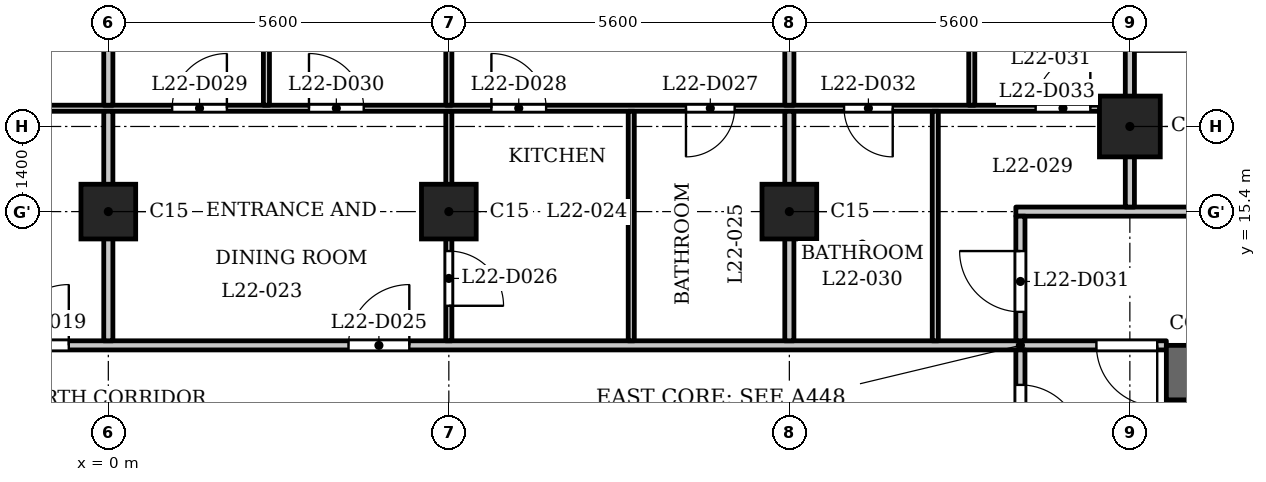
"""IFC4 building model, lengths in metres.
Left out: names, types, materials, properties, quantities, classifications, styles, units other than length and angle.
Written with IfcOpenShell. Run it as: python <this file> out.ifc"""

import sys

from ifc_helpers import new_model, si_unit, direction, frame, frame_2d, origin, origin_2d, place, context, subcontext, project, spatial, rectangle, extrude, element, fill, save


model = new_model("IFC4")
c1 = context("Model", 3, precision=1e-05, world=origin(), true_north=direction((0.0, 1.0)))
c2 = subcontext(c1, "Body", "Model", "MODEL_VIEW")
j1 = project(units=[si_unit("LENGTHUNIT", "METRE"), si_unit("PLANEANGLEUNIT", "RADIAN")], contexts=[c1])
p1 = place(None, origin())
s1 = spatial("IfcSite", under=j1, at=p1, CompositionType="ELEMENT")
p2 = place(p1, origin())
s2 = spatial("IfcBuilding", under=s1, at=p2, CompositionType="ELEMENT")
p3 = place(p2, frame((0.0, 0.0, 90.3)))
s3 = spatial("IfcBuildingStorey", under=s2, at=p3, CompositionType="ELEMENT", Elevation=90.3)
p4 = place(p3, frame((16.8, 16.8, 0.0), z_axis=(0.0, 0.0, 1.0), x_axis=(1.0, 0.0, 0.0)))
e1 = element("IfcColumn", 1, at=p4, inside=s3, PredefinedType="COLUMN", context=c2, shape_type="SweptSolid", body=[
    extrude(rectangle(XDim=1.0, YDim=1.0, at=origin_2d()), origin(), (0.0, 0.0, 1.0), 3.5),
])
for number, where, z_axis, x_axis in (
    (2, (0.0, 15.4, 0.0), (0.0, 0.0, 1.0), (1.0, 0.0, 0.0)),
    (3, (5.6, 15.4, 0.0), (0.0, 0.0, 1.0), (1.0, 0.0, 0.0)),
    (4, (11.2, 15.4, 0.0), (0.0, 0.0, 1.0), (1.0, 0.0, 0.0)),
):
    element("IfcColumn", number, at=place(p3, frame(where, z_axis=z_axis, x_axis=x_axis)), inside=s3, PredefinedType="COLUMN", context=c2, shape_type="SweptSolid", body=[
        extrude(rectangle(XDim=0.9, YDim=0.9, at=origin_2d()), origin(), (0.0, 0.0, 1.0), 3.5),
    ])
p5 = place(p3, frame((17.4, 12.75, 0.0), z_axis=(0.0, 0.0, 1.0), x_axis=(1.0, 0.0, 0.0)))
e5 = element("IfcWall", 5, at=p5, inside=s3, PredefinedType="SHEAR", context=c2, shape_type="SweptSolid", body=[
    extrude(rectangle(XDim=10.4, YDim=0.9, at=frame_2d((5.2, 0.0))), origin(), (0.0, 0.0, 1.0), 3.2),
])
p6 = place(p3, frame((17.6, -12.3, 0.0), z_axis=(0.0, 0.0, 1.0), x_axis=(0.0, 1.0, 0.0)))
e6 = element("IfcWall", 6, at=p6, inside=s3, PredefinedType="SHEAR", context=c2, shape_type="SweptSolid", body=[
    extrude(rectangle(XDim=24.6, YDim=0.4, at=frame_2d((12.3, 0.0))), origin(), (0.0, 0.0, 1.0), 3.2),
])
p7 = place(p6, frame((6.0, 0.0, 0.0)))
e7 = element("IfcOpeningElement", 7, at=p7, cuts=e6, PredefinedType="OPENING", context=c2, shape_type="SweptSolid", body=[
    extrude(rectangle(XDim=1.1, YDim=2.1, at=frame_2d((0.55, 1.05))), frame((0.0, 0.21, 0.0), z_axis=(0.0, -1.0, 0.0), x_axis=(1.0, 0.0, 0.0)), (0.0, 0.0, 1.0), 0.42),
])
p8 = place(p6, frame((8.4, 0.0, 0.0)))
e8 = element("IfcOpeningElement", 8, at=p8, cuts=e6, PredefinedType="OPENING", context=c2, shape_type="SweptSolid", body=[
    extrude(rectangle(XDim=1.1, YDim=2.1, at=frame_2d((0.55, 1.05))), frame((0.0, 0.21, 0.0), z_axis=(0.0, -1.0, 0.0), x_axis=(1.0, 0.0, 0.0)), (0.0, 0.0, 1.0), 0.42),
])
p9 = place(p6, frame((10.8, 0.0, 0.0)))
e9 = element("IfcOpeningElement", 9, at=p9, cuts=e6, PredefinedType="OPENING", context=c2, shape_type="SweptSolid", body=[
    extrude(rectangle(XDim=1.1, YDim=2.1, at=frame_2d((0.55, 1.05))), frame((0.0, 0.21, 0.0), z_axis=(0.0, -1.0, 0.0), x_axis=(1.0, 0.0, 0.0)), (0.0, 0.0, 1.0), 0.42),
])
p10 = place(p6, frame((16.75, 0.0, 0.0)))
e10 = element("IfcOpeningElement", 10, at=p10, cuts=e6, PredefinedType="OPENING", context=c2, shape_type="SweptSolid", body=[
    extrude(rectangle(XDim=0.9, YDim=2.1, at=frame_2d((0.45, 1.05))), frame((0.0, 0.21, 0.0), z_axis=(0.0, -1.0, 0.0), x_axis=(1.0, 0.0, 0.0)), (0.0, 0.0, 1.0), 0.42),
])
p11 = place(p6, frame((22.8, 0.0, 0.0)))
e11 = element("IfcOpeningElement", 11, at=p11, cuts=e6, PredefinedType="OPENING", context=c2, shape_type="SweptSolid", body=[
    extrude(rectangle(XDim=1.1, YDim=2.1, at=frame_2d((0.55, 1.05))), frame((0.0, 0.21, 0.0), z_axis=(0.0, -1.0, 0.0), x_axis=(1.0, 0.0, 0.0)), (0.0, 0.0, 1.0), 0.42),
])
p12 = place(p6, frame((0.7, 0.0, 0.0)))
e12 = element("IfcOpeningElement", 12, at=p12, cuts=e6, PredefinedType="OPENING", context=c2, shape_type="SweptSolid", body=[
    extrude(rectangle(XDim=1.1, YDim=2.1, at=frame_2d((0.55, 1.05))), frame((0.0, 0.21, 0.0), z_axis=(0.0, -1.0, 0.0), x_axis=(1.0, 0.0, 0.0)), (0.0, 0.0, 1.0), 0.42),
])
p13 = place(p6, frame((12.775, 0.0, 0.0)))
e13 = element("IfcOpeningElement", 13, at=p13, cuts=e6, PredefinedType="OPENING", context=c2, shape_type="SweptSolid", body=[
    extrude(rectangle(XDim=1.8, YDim=2.1, at=frame_2d((0.9, 1.05))), frame((0.0, 0.21, 0.0), z_axis=(0.0, -1.0, 0.0), x_axis=(1.0, 0.0, 0.0)), (0.0, 0.0, 1.0), 0.42),
])
p14 = place(p3, frame((-17.4, 13.2, 0.0), z_axis=(0.0, 0.0, 1.0), x_axis=(1.0, 0.0, 0.0)))
e14 = element("IfcWall", 14, at=p14, inside=s3, PredefinedType="PARTITIONING", context=c2, shape_type="SweptSolid", body=[
    extrude(rectangle(XDim=34.8, YDim=0.15, at=frame_2d((17.4, 0.0))), origin(), (0.0, 0.0, 1.0), 3.2),
])
p15 = place(p14, frame((0.25, 0.0, 0.0)))
e15 = element("IfcOpeningElement", 15, at=p15, cuts=e14, PredefinedType="OPENING", context=c2, shape_type="SweptSolid", body=[
    extrude(rectangle(XDim=1.0, YDim=2.1, at=frame_2d((0.5, 1.05))), frame((0.0, 0.085, 0.0), z_axis=(0.0, -1.0, 0.0), x_axis=(1.0, 0.0, 0.0)), (0.0, 0.0, 1.0), 0.17),
])
p16 = place(p14, frame((33.65, 0.0, 0.0)))
e16 = element("IfcOpeningElement", 16, at=p16, cuts=e14, PredefinedType="OPENING", context=c2, shape_type="SweptSolid", body=[
    extrude(rectangle(XDim=1.0, YDim=2.1, at=frame_2d((0.5, 1.05))), frame((0.0, 0.085, 0.0), z_axis=(0.0, -1.0, 0.0), x_axis=(1.0, 0.0, 0.0)), (0.0, 0.0, 1.0), 0.17),
])
p17 = place(p14, frame((15.75, 0.0, 0.0)))
e17 = element("IfcOpeningElement", 17, at=p17, cuts=e14, PredefinedType="OPENING", context=c2, shape_type="SweptSolid", body=[
    extrude(rectangle(XDim=1.0, YDim=2.1, at=frame_2d((0.5, 1.05))), frame((0.0, 0.085, 0.0), z_axis=(0.0, -1.0, 0.0), x_axis=(1.0, 0.0, 0.0)), (0.0, 0.0, 1.0), 0.17),
])
p18 = place(p14, frame((21.35, 0.0, 0.0)))
e18 = element("IfcOpeningElement", 18, at=p18, cuts=e14, PredefinedType="OPENING", context=c2, shape_type="SweptSolid", body=[
    extrude(rectangle(XDim=1.0, YDim=2.1, at=frame_2d((0.5, 1.05))), frame((0.0, 0.085, 0.0), z_axis=(0.0, -1.0, 0.0), x_axis=(1.0, 0.0, 0.0)), (0.0, 0.0, 1.0), 0.17),
])
p19 = place(p3, frame((14.925, 15.4, 0.0), z_axis=(0.0, 0.0, 1.0), x_axis=(1.0, 0.0, 0.0)))
e19 = element("IfcWall", 19, at=p19, inside=s3, PredefinedType="PARTITIONING", context=c2, shape_type="SweptSolid", body=[
    extrude(rectangle(XDim=12.559, YDim=0.15, at=frame_2d((6.279, 0.0))), origin(), (0.0, 0.0, 1.0), 3.2),
])
p20 = place(p19, frame((5.825, 0.0, 0.0)))
e20 = element("IfcOpeningElement", 20, at=p20, cuts=e19, PredefinedType="OPENING", context=c2, shape_type="SweptSolid", body=[
    extrude(rectangle(XDim=1.0, YDim=2.1, at=frame_2d((0.5, 1.05))), frame((0.0, 0.085, 0.0), z_axis=(0.0, -1.0, 0.0), x_axis=(1.0, 0.0, 0.0)), (0.0, 0.0, 1.0), 0.17),
])
p21 = place(p3, frame((-16.725, 17.1, 0.0), z_axis=(0.0, 0.0, 1.0), x_axis=(1.0, 0.0, 0.0)))
e21 = element("IfcWall", 21, at=p21, inside=s3, PredefinedType="PARTITIONING", context=c2, shape_type="SweptSolid", body=[
    extrude(rectangle(XDim=33.45, YDim=0.1, at=frame_2d((16.725, 0.0))), origin(), (0.0, 0.0, 1.0), 3.2),
])
p22 = place(p21, frame((3.925, 0.0, 0.0)))
e22 = element("IfcOpeningElement", 22, at=p22, cuts=e21, PredefinedType="OPENING", context=c2, shape_type="SweptSolid", body=[
    extrude(rectangle(XDim=0.8, YDim=2.1, at=frame_2d((0.4, 1.05))), frame((0.0, 0.06, 0.0), z_axis=(0.0, -1.0, 0.0), x_axis=(1.0, 0.0, 0.0)), (0.0, 0.0, 1.0), 0.12),
])
p23 = place(p21, frame((0.975, 0.0, 0.0)))
e23 = element("IfcOpeningElement", 23, at=p23, cuts=e21, PredefinedType="OPENING", context=c2, shape_type="SweptSolid", body=[
    extrude(rectangle(XDim=0.9, YDim=2.1, at=frame_2d((0.45, 1.05))), frame((0.0, 0.06, 0.0), z_axis=(0.0, -1.0, 0.0), x_axis=(1.0, 0.0, 0.0)), (0.0, 0.0, 1.0), 0.12),
])
p24 = place(p21, frame((6.425, 0.0, 0.0)))
e24 = element("IfcOpeningElement", 24, at=p24, cuts=e21, PredefinedType="OPENING", context=c2, shape_type="SweptSolid", body=[
    extrude(rectangle(XDim=0.8, YDim=2.1, at=frame_2d((0.4, 1.05))), frame((0.0, 0.06, 0.0), z_axis=(0.0, -1.0, 0.0), x_axis=(1.0, 0.0, 0.0)), (0.0, 0.0, 1.0), 0.12),
])
p25 = place(p21, frame((8.825, 0.0, 0.0)))
e25 = element("IfcOpeningElement", 25, at=p25, cuts=e21, PredefinedType="OPENING", context=c2, shape_type="SweptSolid", body=[
    extrude(rectangle(XDim=0.9, YDim=2.1, at=frame_2d((0.45, 1.05))), frame((0.0, 0.06, 0.0), z_axis=(0.0, -1.0, 0.0), x_axis=(1.0, 0.0, 0.0)), (0.0, 0.0, 1.0), 0.12),
])
p26 = place(p21, frame((12.375, 0.0, 0.0)))
e26 = element("IfcOpeningElement", 26, at=p26, cuts=e21, PredefinedType="OPENING", context=c2, shape_type="SweptSolid", body=[
    extrude(rectangle(XDim=0.9, YDim=2.1, at=frame_2d((0.45, 1.05))), frame((0.0, 0.06, 0.0), z_axis=(0.0, -1.0, 0.0), x_axis=(1.0, 0.0, 0.0)), (0.0, 0.0, 1.0), 0.12),
])
p27 = place(p21, frame((14.425, 0.0, 0.0)))
e27 = element("IfcOpeningElement", 27, at=p27, cuts=e21, PredefinedType="OPENING", context=c2, shape_type="SweptSolid", body=[
    extrude(rectangle(XDim=0.9, YDim=2.1, at=frame_2d((0.45, 1.05))), frame((0.0, 0.06, 0.0), z_axis=(0.0, -1.0, 0.0), x_axis=(1.0, 0.0, 0.0)), (0.0, 0.0, 1.0), 0.12),
])
p28 = place(p21, frame((26.225, 0.0, 0.0)))
e28 = element("IfcOpeningElement", 28, at=p28, cuts=e21, PredefinedType="OPENING", context=c2, shape_type="SweptSolid", body=[
    extrude(rectangle(XDim=0.8, YDim=2.1, at=frame_2d((0.4, 1.05))), frame((0.0, 0.06, 0.0), z_axis=(0.0, -1.0, 0.0), x_axis=(1.0, 0.0, 0.0)), (0.0, 0.0, 1.0), 0.12),
])
p29 = place(p21, frame((23.025, 0.0, 0.0)))
e29 = element("IfcOpeningElement", 29, at=p29, cuts=e21, PredefinedType="OPENING", context=c2, shape_type="SweptSolid", body=[
    extrude(rectangle(XDim=0.9, YDim=2.1, at=frame_2d((0.45, 1.05))), frame((0.0, 0.06, 0.0), z_axis=(0.0, -1.0, 0.0), x_axis=(1.0, 0.0, 0.0)), (0.0, 0.0, 1.0), 0.12),
])
p30 = place(p21, frame((17.775, 0.0, 0.0)))
e30 = element("IfcOpeningElement", 30, at=p30, cuts=e21, PredefinedType="OPENING", context=c2, shape_type="SweptSolid", body=[
    extrude(rectangle(XDim=0.9, YDim=2.1, at=frame_2d((0.45, 1.05))), frame((0.0, 0.06, 0.0), z_axis=(0.0, -1.0, 0.0), x_axis=(1.0, 0.0, 0.0)), (0.0, 0.0, 1.0), 0.12),
])
p31 = place(p21, frame((20.025, 0.0, 0.0)))
e31 = element("IfcOpeningElement", 31, at=p31, cuts=e21, PredefinedType="OPENING", context=c2, shape_type="SweptSolid", body=[
    extrude(rectangle(XDim=0.9, YDim=2.1, at=frame_2d((0.45, 1.05))), frame((0.0, 0.06, 0.0), z_axis=(0.0, -1.0, 0.0), x_axis=(1.0, 0.0, 0.0)), (0.0, 0.0, 1.0), 0.12),
])
p32 = place(p21, frame((28.825, 0.0, 0.0)))
e32 = element("IfcOpeningElement", 32, at=p32, cuts=e21, PredefinedType="OPENING", context=c2, shape_type="SweptSolid", body=[
    extrude(rectangle(XDim=0.8, YDim=2.1, at=frame_2d((0.4, 1.05))), frame((0.0, 0.06, 0.0), z_axis=(0.0, -1.0, 0.0), x_axis=(1.0, 0.0, 0.0)), (0.0, 0.0, 1.0), 0.12),
])
p33 = place(p21, frame((31.975, 0.0, 0.0)))
e33 = element("IfcOpeningElement", 33, at=p33, cuts=e21, PredefinedType="OPENING", context=c2, shape_type="SweptSolid", body=[
    extrude(rectangle(XDim=0.9, YDim=2.1, at=frame_2d((0.45, 1.05))), frame((0.0, 0.06, 0.0), z_axis=(0.0, -1.0, 0.0), x_axis=(1.0, 0.0, 0.0)), (0.0, 0.0, 1.0), 0.12),
])
p34 = place(p3, frame((0.0, 13.275, 0.0), z_axis=(0.0, 0.0, 1.0), x_axis=(0.0, 1.0, 0.0)))
e34 = element("IfcWall", 34, at=p34, inside=s3, PredefinedType="PARTITIONING", context=c2, shape_type="SweptSolid", body=[
    extrude(rectangle(XDim=3.775, YDim=0.15, at=frame_2d((1.888, 0.0))), origin(), (0.0, 0.0, 1.0), 3.2),
])
p35 = place(p3, frame((0.0, 17.15, 0.0), z_axis=(0.0, 0.0, 1.0), x_axis=(0.0, 1.0, 0.0)))
e35 = element("IfcWall", 35, at=p35, inside=s3, PredefinedType="PARTITIONING", context=c2, shape_type="SweptSolid", body=[
    extrude(rectangle(XDim=5.88, YDim=0.15, at=frame_2d((2.94, 0.0))), origin(), (0.0, 0.0, 1.0), 3.2),
])
p36 = place(p3, frame((2.6, 17.15, 0.0), z_axis=(0.0, 0.0, 1.0), x_axis=(0.0, 1.0, 0.0)))
e36 = element("IfcWall", 36, at=p36, inside=s3, PredefinedType="PARTITIONING", context=c2, shape_type="SweptSolid", body=[
    extrude(rectangle(XDim=4.93, YDim=0.1, at=frame_2d((2.465, 0.0))), origin(), (0.0, 0.0, 1.0), 3.2),
])
p37 = place(p3, frame((5.6, 13.275, 0.0), z_axis=(0.0, 0.0, 1.0), x_axis=(0.0, 1.0, 0.0)))
e37 = element("IfcWall", 37, at=p37, inside=s3, PredefinedType="PARTITIONING", context=c2, shape_type="SweptSolid", body=[
    extrude(rectangle(XDim=3.775, YDim=0.1, at=frame_2d((1.888, 0.0))), origin(), (0.0, 0.0, 1.0), 3.2),
])
p38 = place(p37, frame((0.576, 0.0, 0.0)))
e38 = element("IfcOpeningElement", 38, at=p38, cuts=e37, PredefinedType="OPENING", context=c2, shape_type="SweptSolid", body=[
    extrude(rectangle(XDim=0.9, YDim=2.1, at=frame_2d((0.45, 1.05))), frame((0.0, 0.06, 0.0), z_axis=(0.0, -1.0, 0.0), x_axis=(1.0, 0.0, 0.0)), (0.0, 0.0, 1.0), 0.12),
])
p39 = place(p3, frame((5.6, 17.15, 0.0), z_axis=(0.0, 0.0, 1.0), x_axis=(0.0, 1.0, 0.0)))
e39 = element("IfcWall", 39, at=p39, inside=s3, PredefinedType="PARTITIONING", context=c2, shape_type="SweptSolid", body=[
    extrude(rectangle(XDim=5.88, YDim=0.1, at=frame_2d((2.94, 0.0))), origin(), (0.0, 0.0, 1.0), 3.2),
])
p40 = place(p3, frame((8.6, 13.275, 0.0), z_axis=(0.0, 0.0, 1.0), x_axis=(0.0, 1.0, 0.0)))
e40 = element("IfcWall", 40, at=p40, inside=s3, PredefinedType="PARTITIONING", context=c2, shape_type="SweptSolid", body=[
    extrude(rectangle(XDim=3.775, YDim=0.1, at=frame_2d((1.888, 0.0))), origin(), (0.0, 0.0, 1.0), 3.2),
])
p41 = place(p3, frame((11.2, 13.275, 0.0), z_axis=(0.0, 0.0, 1.0), x_axis=(0.0, 1.0, 0.0)))
e41 = element("IfcWall", 41, at=p41, inside=s3, PredefinedType="PARTITIONING", context=c2, shape_type="SweptSolid", body=[
    extrude(rectangle(XDim=3.775, YDim=0.15, at=frame_2d((1.888, 0.0))), origin(), (0.0, 0.0, 1.0), 3.2),
])
p42 = place(p3, frame((11.2, 17.15, 0.0), z_axis=(0.0, 0.0, 1.0), x_axis=(0.0, 1.0, 0.0)))
e42 = element("IfcWall", 42, at=p42, inside=s3, PredefinedType="PARTITIONING", context=c2, shape_type="SweptSolid", body=[
    extrude(rectangle(XDim=5.88, YDim=0.15, at=frame_2d((2.94, 0.0))), origin(), (0.0, 0.0, 1.0), 3.2),
])
p43 = place(p3, frame((13.6, 13.275, 0.0), z_axis=(0.0, 0.0, 1.0), x_axis=(0.0, 1.0, 0.0)))
e43 = element("IfcWall", 43, at=p43, inside=s3, PredefinedType="PARTITIONING", context=c2, shape_type="SweptSolid", body=[
    extrude(rectangle(XDim=3.775, YDim=0.1, at=frame_2d((1.888, 0.0))), origin(), (0.0, 0.0, 1.0), 3.2),
])
p44 = place(p3, frame((14.2, 17.15, 0.0), z_axis=(0.0, 0.0, 1.0), x_axis=(0.0, 1.0, 0.0)))
e44 = element("IfcWall", 44, at=p44, inside=s3, PredefinedType="PARTITIONING", context=c2, shape_type="SweptSolid", body=[
    extrude(rectangle(XDim=4.93, YDim=0.1, at=frame_2d((2.465, 0.0))), origin(), (0.0, 0.0, 1.0), 3.2),
])
p45 = place(p44, frame((1.36, 0.0, 0.0)))
e45 = element("IfcOpeningElement", 45, at=p45, cuts=e44, PredefinedType="OPENING", context=c2, shape_type="SweptSolid", body=[
    extrude(rectangle(XDim=0.9, YDim=2.1, at=frame_2d((0.45, 1.05))), frame((0.0, 0.06, 0.0), z_axis=(0.0, -1.0, 0.0), x_axis=(1.0, 0.0, 0.0)), (0.0, 0.0, 1.0), 0.12),
])
p46 = place(p3, frame((15.0, 6.769, 0.0), z_axis=(0.0, 0.0, 1.0), x_axis=(0.0, 1.0, 0.0)))
e46 = element("IfcWall", 46, at=p46, inside=s3, PredefinedType="PARTITIONING", context=c2, shape_type="SweptSolid", body=[
    extrude(rectangle(XDim=6.356, YDim=0.15, at=frame_2d((3.178, 0.0))), origin(), (0.0, 0.0, 1.0), 3.2),
])
p47 = place(p46, frame((4.781, 0.0, 0.0)))
e47 = element("IfcOpeningElement", 47, at=p47, cuts=e46, PredefinedType="OPENING", context=c2, shape_type="SweptSolid", body=[
    extrude(rectangle(XDim=1.0, YDim=2.1, at=frame_2d((0.5, 1.05))), frame((0.0, 0.085, 0.0), z_axis=(0.0, -1.0, 0.0), x_axis=(1.0, 0.0, 0.0)), (0.0, 0.0, 1.0), 0.17),
])
p48 = place(p3, frame((15.0, 13.275, 0.0), z_axis=(0.0, 0.0, 1.0), x_axis=(0.0, 1.0, 0.0)))
e48 = element("IfcWall", 48, at=p48, inside=s3, PredefinedType="PARTITIONING", context=c2, shape_type="SweptSolid", body=[
    extrude(rectangle(XDim=2.05, YDim=0.15, at=frame_2d((1.025, 0.0))), origin(), (0.0, 0.0, 1.0), 3.2),
])
p49 = place(p48, frame((0.476, 0.0, 0.0)))
e49 = element("IfcOpeningElement", 49, at=p49, cuts=e48, PredefinedType="OPENING", context=c2, shape_type="SweptSolid", body=[
    extrude(rectangle(XDim=1.0, YDim=2.1, at=frame_2d((0.5, 1.05))), frame((0.0, 0.085, 0.0), z_axis=(0.0, -1.0, 0.0), x_axis=(1.0, 0.0, 0.0)), (0.0, 0.0, 1.0), 0.17),
])
p50 = place(p3, frame((16.8, 15.475, 0.0), z_axis=(0.0, 0.0, 1.0), x_axis=(0.0, 1.0, 0.0)))
e50 = element("IfcWall", 50, at=p50, inside=s3, PredefinedType="PARTITIONING", context=c2, shape_type="SweptSolid", body=[
    extrude(rectangle(XDim=7.555, YDim=0.15, at=frame_2d((3.777, 0.0))), origin(), (0.0, 0.0, 1.0), 3.2),
])
p51 = place(p47, origin())
e51 = element("IfcDoor", 51, at=p51, inside=s3, OperationType="SINGLE_SWING_LEFT", PredefinedType="DOOR", context=c2, shape_type="SweptSolid", body=[
    extrude(rectangle(XDim=1.0, YDim=2.1, at=frame_2d((0.5, 1.05))), frame((0.0, 0.025, 0.0), z_axis=(0.0, -1.0, 0.0), x_axis=(1.0, 0.0, 0.0)), (0.0, 0.0, 1.0), 0.05),
])
fill(e47, e51)
p52 = place(p16, origin())
e52 = element("IfcDoor", 52, at=p52, inside=s3, OperationType="SINGLE_SWING_RIGHT", PredefinedType="DOOR", context=c2, shape_type="SweptSolid", body=[
    extrude(rectangle(XDim=1.0, YDim=2.1, at=frame_2d((0.5, 1.05))), frame((0.0, 0.025, 0.0), z_axis=(0.0, -1.0, 0.0), x_axis=(1.0, 0.0, 0.0)), (0.0, 0.0, 1.0), 0.05),
])
fill(e16, e52)
p53 = place(p17, origin())
e53 = element("IfcDoor", 53, at=p53, inside=s3, OperationType="SINGLE_SWING_LEFT", PredefinedType="DOOR", context=c2, shape_type="SweptSolid", body=[
    extrude(rectangle(XDim=1.0, YDim=2.1, at=frame_2d((0.5, 1.05))), frame((0.0, 0.025, 0.0), z_axis=(0.0, -1.0, 0.0), x_axis=(1.0, 0.0, 0.0)), (0.0, 0.0, 1.0), 0.05),
])
fill(e17, e53)
p54 = place(p18, origin())
e54 = element("IfcDoor", 54, at=p54, inside=s3, OperationType="SINGLE_SWING_LEFT", PredefinedType="DOOR", context=c2, shape_type="SweptSolid", body=[
    extrude(rectangle(XDim=1.0, YDim=2.1, at=frame_2d((0.5, 1.05))), frame((0.0, 0.025, 0.0), z_axis=(0.0, -1.0, 0.0), x_axis=(1.0, 0.0, 0.0)), (0.0, 0.0, 1.0), 0.05),
])
fill(e18, e54)
p55 = place(p38, origin())
e55 = element("IfcDoor", 55, at=p55, inside=s3, OperationType="SINGLE_SWING_LEFT", PredefinedType="DOOR", context=c2, shape_type="SweptSolid", body=[
    extrude(rectangle(XDim=0.9, YDim=2.1, at=frame_2d((0.45, 1.05))), frame((0.0, 0.025, 0.0), z_axis=(0.0, -1.0, 0.0), x_axis=(1.0, 0.0, 0.0)), (0.0, 0.0, 1.0), 0.05),
])
fill(e38, e55)
p56 = place(p28, origin())
e56 = element("IfcDoor", 56, at=p56, inside=s3, OperationType="SINGLE_SWING_LEFT", PredefinedType="DOOR", context=c2, shape_type="SweptSolid", body=[
    extrude(rectangle(XDim=0.8, YDim=2.1, at=frame_2d((0.4, 1.05))), frame((0.0, 0.025, 0.0), z_axis=(0.0, -1.0, 0.0), x_axis=(1.0, 0.0, 0.0)), (0.0, 0.0, 1.0), 0.05),
])
fill(e28, e56)
p57 = place(p29, origin())
e57 = element("IfcDoor", 57, at=p57, inside=s3, OperationType="SINGLE_SWING_RIGHT", PredefinedType="DOOR", context=c2, shape_type="SweptSolid", body=[
    extrude(rectangle(XDim=0.9, YDim=2.1, at=frame_2d((0.45, 1.05))), frame((0.0, 0.025, 0.0), z_axis=(0.0, -1.0, 0.0), x_axis=(1.0, 0.0, 0.0)), (0.0, 0.0, 1.0), 0.05),
])
fill(e29, e57)
p58 = place(p30, origin())
e58 = element("IfcDoor", 58, at=p58, inside=s3, OperationType="SINGLE_SWING_LEFT", PredefinedType="DOOR", context=c2, shape_type="SweptSolid", body=[
    extrude(rectangle(XDim=0.9, YDim=2.1, at=frame_2d((0.45, 1.05))), frame((0.0, 0.025, 0.0), z_axis=(0.0, -1.0, 0.0), x_axis=(1.0, 0.0, 0.0)), (0.0, 0.0, 1.0), 0.05),
])
fill(e30, e58)
p59 = place(p31, origin())
e59 = element("IfcDoor", 59, at=p59, inside=s3, OperationType="SINGLE_SWING_RIGHT", PredefinedType="DOOR", context=c2, shape_type="SweptSolid", body=[
    extrude(rectangle(XDim=0.9, YDim=2.1, at=frame_2d((0.45, 1.05))), frame((0.0, 0.025, 0.0), z_axis=(0.0, -1.0, 0.0), x_axis=(1.0, 0.0, 0.0)), (0.0, 0.0, 1.0), 0.05),
])
fill(e31, e59)
p60 = place(p49, origin())
e60 = element("IfcDoor", 60, at=p60, inside=s3, OperationType="SINGLE_SWING_LEFT", PredefinedType="DOOR", context=c2, shape_type="SweptSolid", body=[
    extrude(rectangle(XDim=1.0, YDim=2.1, at=frame_2d((0.5, 1.05))), frame((0.0, 0.025, 0.0), z_axis=(0.0, -1.0, 0.0), x_axis=(1.0, 0.0, 0.0)), (0.0, 0.0, 1.0), 0.05),
])
fill(e49, e60)
p61 = place(p32, origin())
e61 = element("IfcDoor", 61, at=p61, inside=s3, OperationType="SINGLE_SWING_RIGHT", PredefinedType="DOOR", context=c2, shape_type="SweptSolid", body=[
    extrude(rectangle(XDim=0.8, YDim=2.1, at=frame_2d((0.4, 1.05))), frame((0.0, 0.025, 0.0), z_axis=(0.0, -1.0, 0.0), x_axis=(1.0, 0.0, 0.0)), (0.0, 0.0, 1.0), 0.05),
])
fill(e32, e61)
p62 = place(p33, origin())
e62 = element("IfcDoor", 62, at=p62, inside=s3, OperationType="SINGLE_SWING_LEFT", PredefinedType="DOOR", context=c2, shape_type="SweptSolid", body=[
    extrude(rectangle(XDim=0.9, YDim=2.1, at=frame_2d((0.45, 1.05))), frame((0.0, 0.025, 0.0), z_axis=(0.0, -1.0, 0.0), x_axis=(1.0, 0.0, 0.0)), (0.0, 0.0, 1.0), 0.05),
])
fill(e33, e62)
save(model, sys.argv[1])
